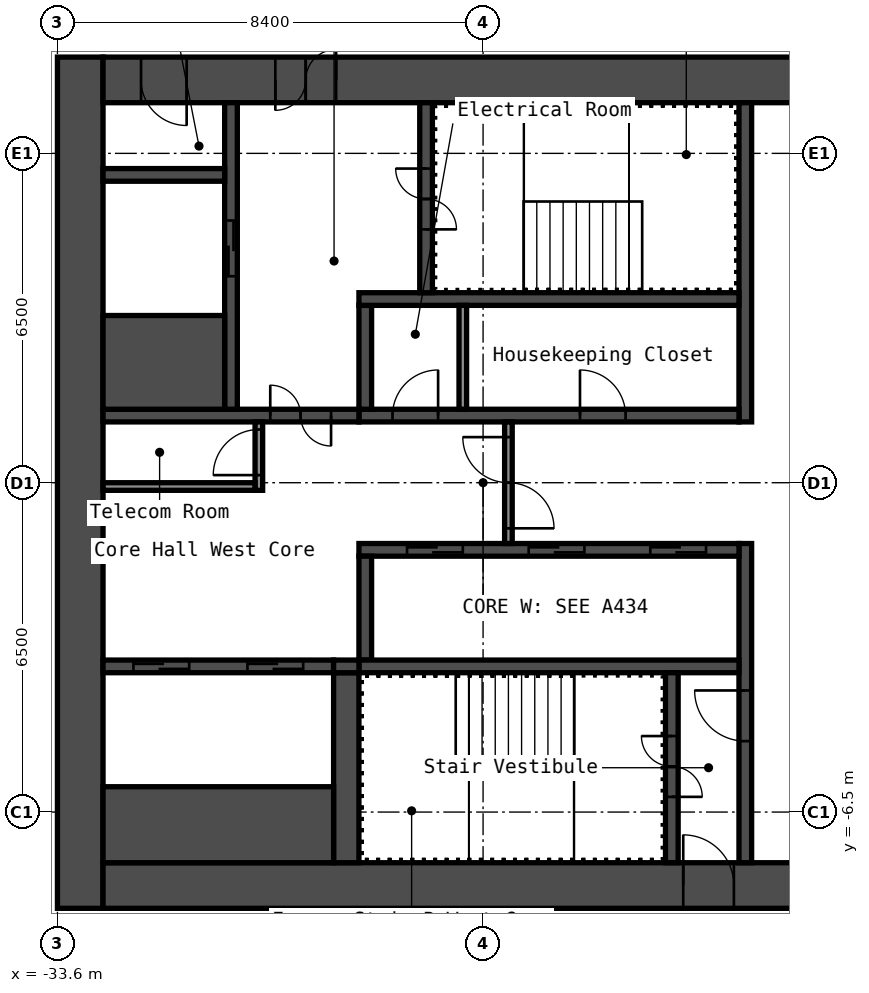
"""IFC4 building model, lengths in metres.
Left out: names, types, materials, properties, quantities, classifications, styles, units other than length and angle.
Written with IfcOpenShell. Run it as: python <this file> out.ifc"""

import sys

from ifc_helpers import new_model, si_unit, direction, frame, frame_2d, origin, place, context, subcontext, project, spatial, rectangle, extrude, element, fill, save


model = new_model("IFC4")
c1 = context("Model", 3, precision=1e-05, world=origin(), true_north=direction((0.0, 1.0)))
c2 = subcontext(c1, "Body", "Model", "MODEL_VIEW")
j1 = project(units=[si_unit("LENGTHUNIT", "METRE"), si_unit("PLANEANGLEUNIT", "RADIAN")], contexts=[c1])
p1 = place(None, origin())
s1 = spatial("IfcSite", under=j1, at=p1, CompositionType="ELEMENT")
p2 = place(p1, origin())
s2 = spatial("IfcBuilding", under=s1, at=p2, CompositionType="ELEMENT")
p3 = place(p2, frame((0.0, 0.0, 232.6)))
s3 = spatial("IfcBuildingStorey", under=s2, at=p3, CompositionType="ELEMENT", Elevation=232.6)
p4 = place(p3, frame((-33.15, -8.4, 0.0), z_axis=(0.0, 0.0, 1.0), x_axis=(0.0, 1.0, 0.0)))
e1 = element("IfcWall", 1, at=p4, inside=s3, PredefinedType="SHEAR", context=c2, shape_type="SweptSolid", body=[
    extrude(rectangle(XDim=16.8, YDim=0.9, at=frame_2d((8.4, 0.0))), origin(), (0.0, 0.0, 1.0), 5.95),
])
p5 = place(p3, frame((-32.7, 7.95, 0.0), z_axis=(0.0, 0.0, 1.0), x_axis=(1.0, 0.0, 0.0)))
e2 = element("IfcWall", 2, at=p5, inside=s3, PredefinedType="SHEAR", context=c2, shape_type="SweptSolid", body=[
    extrude(rectangle(XDim=15.0, YDim=0.9, at=frame_2d((7.5, 0.0))), origin(), (0.0, 0.0, 1.0), 5.95),
])
p6 = place(p5, frame((3.4, 0.0, 0.0)))
e3 = element("IfcOpeningElement", 3, at=p6, cuts=e2, PredefinedType="OPENING", context=c2, shape_type="SweptSolid", body=[
    extrude(rectangle(XDim=1.2, YDim=2.1, at=frame_2d((0.6, 1.05))), frame((0.0, 0.46, 0.0), z_axis=(0.0, -1.0, 0.0), x_axis=(1.0, 0.0, 0.0)), (0.0, 0.0, 1.0), 0.92),
])
p7 = place(p5, frame((0.75, 0.0, 0.0)))
e4 = element("IfcOpeningElement", 4, at=p7, cuts=e2, PredefinedType="OPENING", context=c2, shape_type="SweptSolid", body=[
    extrude(rectangle(XDim=0.9, YDim=2.1, at=frame_2d((0.45, 1.05))), frame((0.0, 0.46, 0.0), z_axis=(0.0, -1.0, 0.0), x_axis=(1.0, 0.0, 0.0)), (0.0, 0.0, 1.0), 0.92),
])
p8 = place(p3, frame((-32.7, -7.95, 0.0), z_axis=(0.0, 0.0, 1.0), x_axis=(1.0, 0.0, 0.0)))
e5 = element("IfcWall", 5, at=p8, inside=s3, PredefinedType="SHEAR", context=c2, shape_type="SweptSolid", body=[
    extrude(rectangle(XDim=15.0, YDim=0.9, at=frame_2d((7.5, 0.0))), origin(), (0.0, 0.0, 1.0), 5.95),
])
p9 = place(p8, frame((11.45, 0.0, 0.0)))
e6 = element("IfcOpeningElement", 6, at=p9, cuts=e5, PredefinedType="OPENING", context=c2, shape_type="SweptSolid", body=[
    extrude(rectangle(XDim=1.0, YDim=2.1, at=frame_2d((0.5, 1.05))), frame((0.0, 0.46, 0.0), z_axis=(0.0, -1.0, 0.0), x_axis=(1.0, 0.0, 0.0)), (0.0, 0.0, 1.0), 0.92),
])
p10 = place(p3, frame((-20.025, 1.2, 0.0), z_axis=(0.0, 0.0, 1.0), x_axis=(0.0, 1.0, 0.0)))
e7 = element("IfcWall", 7, at=p10, inside=s3, PredefinedType="SHEAR", context=c2, shape_type="SweptSolid", body=[
    extrude(rectangle(XDim=6.3, YDim=0.25, at=frame_2d((3.15, 0.0))), origin(), (0.0, 0.0, 1.0), 5.95),
])
p11 = place(p3, frame((-20.025, -7.5, 0.0), z_axis=(0.0, 0.0, 1.0), x_axis=(0.0, 1.0, 0.0)))
e8 = element("IfcWall", 8, at=p11, inside=s3, PredefinedType="SHEAR", context=c2, shape_type="SweptSolid", body=[
    extrude(rectangle(XDim=6.3, YDim=0.25, at=frame_2d((3.15, 0.0))), origin(), (0.0, 0.0, 1.0), 5.95),
])
p12 = place(p11, frame((2.4, 0.0, 0.0)))
e9 = element("IfcOpeningElement", 9, at=p12, cuts=e8, PredefinedType="OPENING", context=c2, shape_type="SweptSolid", body=[
    extrude(rectangle(XDim=1.0, YDim=2.1, at=frame_2d((0.5, 1.05))), frame((0.0, 0.135, 0.0), z_axis=(0.0, -1.0, 0.0), x_axis=(1.0, 0.0, 0.0)), (0.0, 0.0, 1.0), 0.27),
])
p13 = place(p3, frame((-27.65, 1.325, 0.0), z_axis=(0.0, 0.0, 1.0), x_axis=(1.0, 0.0, 0.0)))
e10 = element("IfcWall", 10, at=p13, inside=s3, PredefinedType="SHEAR", context=c2, shape_type="SweptSolid", body=[
    extrude(rectangle(XDim=7.5, YDim=0.25, at=frame_2d((3.75, 0.0))), origin(), (0.0, 0.0, 1.0), 5.95),
])
p14 = place(p13, frame((4.363, 0.0, 0.0)))
e11 = element("IfcOpeningElement", 11, at=p14, cuts=e10, PredefinedType="OPENING", context=c2, shape_type="SweptSolid", body=[
    extrude(rectangle(XDim=0.9, YDim=2.1, at=frame_2d((0.45, 1.05))), frame((0.0, 0.135, 0.0), z_axis=(0.0, -1.0, 0.0), x_axis=(1.0, 0.0, 0.0)), (0.0, 0.0, 1.0), 0.27),
])
p15 = place(p13, frame((0.663, 0.0, 0.0)))
e12 = element("IfcOpeningElement", 12, at=p15, cuts=e10, PredefinedType="OPENING", context=c2, shape_type="SweptSolid", body=[
    extrude(rectangle(XDim=0.9, YDim=2.1, at=frame_2d((0.45, 1.05))), frame((0.0, 0.135, 0.0), z_axis=(0.0, -1.0, 0.0), x_axis=(1.0, 0.0, 0.0)), (0.0, 0.0, 1.0), 0.27),
])
p16 = place(p3, frame((-27.525, 1.45, 0.0), z_axis=(0.0, 0.0, 1.0), x_axis=(0.0, 1.0, 0.0)))
e13 = element("IfcWall", 13, at=p16, inside=s3, PredefinedType="SHEAR", context=c2, shape_type="SweptSolid", body=[
    extrude(rectangle(XDim=2.05, YDim=0.25, at=frame_2d((1.025, 0.0))), origin(), (0.0, 0.0, 1.0), 5.95),
])
p17 = place(p3, frame((-27.65, 3.625, 0.0), z_axis=(0.0, 0.0, 1.0), x_axis=(1.0, 0.0, 0.0)))
e14 = element("IfcWall", 14, at=p17, inside=s3, PredefinedType="SHEAR", context=c2, shape_type="SweptSolid", body=[
    extrude(rectangle(XDim=7.5, YDim=0.25, at=frame_2d((3.75, 0.0))), origin(), (0.0, 0.0, 1.0), 5.95),
])
p18 = place(p3, frame((-26.325, 3.75, 0.0), z_axis=(0.0, 0.0, 1.0), x_axis=(0.0, 1.0, 0.0)))
e15 = element("IfcWall", 15, at=p18, inside=s3, PredefinedType="SHEAR", context=c2, shape_type="SweptSolid", body=[
    extrude(rectangle(XDim=3.75, YDim=0.25, at=frame_2d((1.875, 0.0))), origin(), (0.0, 0.0, 1.0), 5.95),
])
p19 = place(p18, frame((1.25, 0.0, 0.0)))
e16 = element("IfcOpeningElement", 16, at=p19, cuts=e15, PredefinedType="OPENING", context=c2, shape_type="SweptSolid", body=[
    extrude(rectangle(XDim=1.2, YDim=2.1, at=frame_2d((0.6, 1.05))), frame((0.0, 0.135, 0.0), z_axis=(0.0, -1.0, 0.0), x_axis=(1.0, 0.0, 0.0)), (0.0, 0.0, 1.0), 0.27),
])
p20 = place(p3, frame((-32.7, 1.325, 0.0), z_axis=(0.0, 0.0, 1.0), x_axis=(1.0, 0.0, 0.0)))
e17 = element("IfcWall", 17, at=p20, inside=s3, PredefinedType="SHEAR", context=c2, shape_type="SweptSolid", body=[
    extrude(rectangle(XDim=5.05, YDim=0.25, at=frame_2d((2.525, 0.0))), origin(), (0.0, 0.0, 1.0), 5.95),
])
p21 = place(p20, frame((3.3, 0.0, 0.0)))
e18 = element("IfcOpeningElement", 18, at=p21, cuts=e17, PredefinedType="OPENING", context=c2, shape_type="SweptSolid", body=[
    extrude(rectangle(XDim=1.2, YDim=2.1, at=frame_2d((0.6, 1.05))), frame((0.0, 0.135, 0.0), z_axis=(0.0, -1.0, 0.0), x_axis=(1.0, 0.0, 0.0)), (0.0, 0.0, 1.0), 0.27),
])
p22 = place(p3, frame((-30.175, 1.45, 0.0), z_axis=(0.0, 0.0, 1.0), x_axis=(0.0, 1.0, 0.0)))
e19 = element("IfcWall", 19, at=p22, inside=s3, PredefinedType="SHEAR", context=c2, shape_type="SweptSolid", body=[
    extrude(rectangle(XDim=6.05, YDim=0.25, at=frame_2d((3.025, 0.0))), origin(), (0.0, 0.0, 1.0), 5.95),
])
p23 = place(p22, frame((2.625, 0.0, 0.0)))
e20 = element("IfcOpeningElement", 20, at=p23, cuts=e19, PredefinedType="OPENING", context=c2, shape_type="SweptSolid", body=[
    extrude(rectangle(XDim=1.1, YDim=2.1, at=frame_2d((0.55, 1.05))), frame((0.0, 0.135, 0.0), z_axis=(0.0, -1.0, 0.0), x_axis=(1.0, 0.0, 0.0)), (0.0, 0.0, 1.0), 0.27),
])
p24 = place(p3, frame((-32.7, 2.375, 0.0), z_axis=(0.0, 0.0, 1.0), x_axis=(1.0, 0.0, 0.0)))
e21 = element("IfcWall", 21, at=p24, inside=s3, PredefinedType="SHEAR", context=c2, shape_type="SweptSolid", body=[
    extrude(rectangle(XDim=2.4, YDim=1.85, at=frame_2d((1.2, 0.0))), origin(), (0.0, 0.0, 1.0), 5.95),
])
p25 = place(p3, frame((-32.7, 6.075, 0.0), z_axis=(0.0, 0.0, 1.0), x_axis=(1.0, 0.0, 0.0)))
e22 = element("IfcWall", 22, at=p25, inside=s3, PredefinedType="SHEAR", context=c2, shape_type="SweptSolid", body=[
    extrude(rectangle(XDim=2.4, YDim=0.25, at=frame_2d((1.2, 0.0))), origin(), (0.0, 0.0, 1.0), 5.95),
])
p26 = place(p3, frame((-27.65, -1.325, 0.0), z_axis=(0.0, 0.0, 1.0), x_axis=(1.0, 0.0, 0.0)))
e23 = element("IfcWall", 23, at=p26, inside=s3, PredefinedType="SHEAR", context=c2, shape_type="SweptSolid", body=[
    extrude(rectangle(XDim=7.5, YDim=0.25, at=frame_2d((3.75, 0.0))), origin(), (0.0, 0.0, 1.0), 5.95),
])
p27 = place(p26, frame((5.75, 0.0, 0.0)))
e24 = element("IfcOpeningElement", 24, at=p27, cuts=e23, PredefinedType="OPENING", context=c2, shape_type="SweptSolid", body=[
    extrude(rectangle(XDim=1.1, YDim=2.1, at=frame_2d((0.55, 1.05))), frame((0.0, 0.135, 0.0), z_axis=(0.0, -1.0, 0.0), x_axis=(1.0, 0.0, 0.0)), (0.0, 0.0, 1.0), 0.27),
])
p28 = place(p26, frame((3.35, 0.0, 0.0)))
e25 = element("IfcOpeningElement", 25, at=p28, cuts=e23, PredefinedType="OPENING", context=c2, shape_type="SweptSolid", body=[
    extrude(rectangle(XDim=1.1, YDim=2.1, at=frame_2d((0.55, 1.05))), frame((0.0, 0.135, 0.0), z_axis=(0.0, -1.0, 0.0), x_axis=(1.0, 0.0, 0.0)), (0.0, 0.0, 1.0), 0.27),
])
p29 = place(p26, frame((0.95, 0.0, 0.0)))
e26 = element("IfcOpeningElement", 26, at=p29, cuts=e23, PredefinedType="OPENING", context=c2, shape_type="SweptSolid", body=[
    extrude(rectangle(XDim=1.1, YDim=2.1, at=frame_2d((0.55, 1.05))), frame((0.0, 0.135, 0.0), z_axis=(0.0, -1.0, 0.0), x_axis=(1.0, 0.0, 0.0)), (0.0, 0.0, 1.0), 0.27),
])
p30 = place(p3, frame((-27.525, -3.5, 0.0), z_axis=(0.0, 0.0, 1.0), x_axis=(0.0, 1.0, 0.0)))
e27 = element("IfcWall", 27, at=p30, inside=s3, PredefinedType="SHEAR", context=c2, shape_type="SweptSolid", body=[
    extrude(rectangle(XDim=2.05, YDim=0.25, at=frame_2d((1.025, 0.0))), origin(), (0.0, 0.0, 1.0), 5.95),
])
p31 = place(p3, frame((-27.65, -3.625, 0.0), z_axis=(0.0, 0.0, 1.0), x_axis=(1.0, 0.0, 0.0)))
e28 = element("IfcWall", 28, at=p31, inside=s3, PredefinedType="SHEAR", context=c2, shape_type="SweptSolid", body=[
    extrude(rectangle(XDim=7.5, YDim=0.25, at=frame_2d((3.75, 0.0))), origin(), (0.0, 0.0, 1.0), 5.95),
])
p32 = place(p3, frame((-21.475, -7.5, 0.0), z_axis=(0.0, 0.0, 1.0), x_axis=(0.0, 1.0, 0.0)))
e29 = element("IfcWall", 29, at=p32, inside=s3, PredefinedType="SHEAR", context=c2, shape_type="SweptSolid", body=[
    extrude(rectangle(XDim=3.75, YDim=0.25, at=frame_2d((1.875, 0.0))), origin(), (0.0, 0.0, 1.0), 5.95),
])
p33 = place(p32, frame((1.3, 0.0, 0.0)))
e30 = element("IfcOpeningElement", 30, at=p33, cuts=e29, PredefinedType="OPENING", context=c2, shape_type="SweptSolid", body=[
    extrude(rectangle(XDim=1.2, YDim=2.1, at=frame_2d((0.6, 1.05))), frame((0.0, 0.135, 0.0), z_axis=(0.0, -1.0, 0.0), x_axis=(1.0, 0.0, 0.0)), (0.0, 0.0, 1.0), 0.27),
])
p34 = place(p3, frame((-27.9, -7.5, 0.0), z_axis=(0.0, 0.0, 1.0), x_axis=(0.0, 1.0, 0.0)))
e31 = element("IfcWall", 31, at=p34, inside=s3, PredefinedType="SHEAR", context=c2, shape_type="SweptSolid", body=[
    extrude(rectangle(XDim=3.75, YDim=0.5, at=frame_2d((1.875, 0.0))), origin(), (0.0, 0.0, 1.0), 5.95),
])
p35 = place(p3, frame((-32.7, -3.625, 0.0), z_axis=(0.0, 0.0, 1.0), x_axis=(1.0, 0.0, 0.0)))
e32 = element("IfcWall", 32, at=p35, inside=s3, PredefinedType="SHEAR", context=c2, shape_type="SweptSolid", body=[
    extrude(rectangle(XDim=4.55, YDim=0.25, at=frame_2d((2.275, 0.0))), origin(), (0.0, 0.0, 1.0), 5.95),
])
p36 = place(p35, frame((2.85, 0.0, 0.0)))
e33 = element("IfcOpeningElement", 33, at=p36, cuts=e32, PredefinedType="OPENING", context=c2, shape_type="SweptSolid", body=[
    extrude(rectangle(XDim=1.1, YDim=2.1, at=frame_2d((0.55, 1.05))), frame((0.0, 0.135, 0.0), z_axis=(0.0, -1.0, 0.0), x_axis=(1.0, 0.0, 0.0)), (0.0, 0.0, 1.0), 0.27),
])
p37 = place(p35, frame((0.6, 0.0, 0.0)))
e34 = element("IfcOpeningElement", 34, at=p37, cuts=e32, PredefinedType="OPENING", context=c2, shape_type="SweptSolid", body=[
    extrude(rectangle(XDim=1.1, YDim=2.1, at=frame_2d((0.55, 1.05))), frame((0.0, 0.135, 0.0), z_axis=(0.0, -1.0, 0.0), x_axis=(1.0, 0.0, 0.0)), (0.0, 0.0, 1.0), 0.27),
])
p38 = place(p3, frame((-32.7, -6.75, 0.0), z_axis=(0.0, 0.0, 1.0), x_axis=(1.0, 0.0, 0.0)))
e35 = element("IfcWall", 35, at=p38, inside=s3, PredefinedType="SHEAR", context=c2, shape_type="SweptSolid", body=[
    extrude(rectangle(XDim=4.55, YDim=1.5, at=frame_2d((2.275, 0.0))), origin(), (0.0, 0.0, 1.0), 5.95),
])
p39 = place(p3, frame((-28.15, -3.625, 0.0), z_axis=(0.0, 0.0, 1.0), x_axis=(1.0, 0.0, 0.0)))
e36 = element("IfcWall", 36, at=p39, inside=s3, PredefinedType="SHEAR", context=c2, shape_type="SweptSolid", body=[
    extrude(rectangle(XDim=0.5, YDim=0.25, at=frame_2d((0.25, 0.0))), origin(), (0.0, 0.0, 1.0), 5.95),
])
p40 = place(p3, frame((-24.7, -1.2, 0.0), z_axis=(0.0, 0.0, 1.0), x_axis=(0.0, 1.0, 0.0)))
e37 = element("IfcWall", 37, at=p40, inside=s3, PredefinedType="PARTITIONING", context=c2, shape_type="SweptSolid", body=[
    extrude(rectangle(XDim=2.4, YDim=0.15, at=frame_2d((1.2, 0.0))), origin(), (0.0, 0.0, 1.0), 5.95),
])
p41 = place(p40, frame((0.3, 0.0, 0.0)))
e38 = element("IfcOpeningElement", 38, at=p41, cuts=e37, PredefinedType="OPENING", context=c2, shape_type="SweptSolid", body=[
    extrude(rectangle(XDim=1.8, YDim=2.1, at=frame_2d((0.9, 1.05))), frame((0.0, 0.085, 0.0), z_axis=(0.0, -1.0, 0.0), x_axis=(1.0, 0.0, 0.0)), (0.0, 0.0, 1.0), 0.17),
])
p42 = place(p3, frame((-29.625, -0.15, 0.0), z_axis=(0.0, 0.0, 1.0), x_axis=(0.0, 1.0, 0.0)))
e39 = element("IfcWall", 39, at=p42, inside=s3, PredefinedType="PARTITIONING", context=c2, shape_type="SweptSolid", body=[
    extrude(rectangle(XDim=1.35, YDim=0.15, at=frame_2d((0.675, 0.0))), origin(), (0.0, 0.0, 1.0), 5.95),
])
p43 = place(p42, frame((0.3, 0.0, 0.0)))
e40 = element("IfcOpeningElement", 40, at=p43, cuts=e39, PredefinedType="OPENING", context=c2, shape_type="SweptSolid", body=[
    extrude(rectangle(XDim=0.9, YDim=2.1, at=frame_2d((0.45, 1.05))), frame((0.0, 0.085, 0.0), z_axis=(0.0, -1.0, 0.0), x_axis=(1.0, 0.0, 0.0)), (0.0, 0.0, 1.0), 0.17),
])
p44 = place(p3, frame((-32.7, -0.075, 0.0), z_axis=(0.0, 0.0, 1.0), x_axis=(1.0, 0.0, 0.0)))
e41 = element("IfcWall", 41, at=p44, inside=s3, PredefinedType="PARTITIONING", context=c2, shape_type="SweptSolid", body=[
    extrude(rectangle(XDim=3.0, YDim=0.15, at=frame_2d((1.5, 0.0))), origin(), (0.0, 0.0, 1.0), 5.95),
])
p45 = place(p3, frame((-25.6, 1.45, 0.0), z_axis=(0.0, 0.0, 1.0), x_axis=(0.0, 1.0, 0.0)))
e42 = element("IfcWall", 42, at=p45, inside=s3, PredefinedType="PARTITIONING", context=c2, shape_type="SweptSolid", body=[
    extrude(rectangle(XDim=2.05, YDim=0.15, at=frame_2d((1.025, 0.0))), origin(), (0.0, 0.0, 1.0), 5.95),
])
p46 = place(p6, origin())
e43 = element("IfcDoor", 43, at=p46, inside=s3, OperationType="DOUBLE_DOOR_SINGLE_SWING", PredefinedType="DOOR", context=c2, shape_type="SweptSolid", body=[
    extrude(rectangle(XDim=1.2, YDim=2.1, at=frame_2d((0.6, 1.05))), frame((0.0, 0.025, 0.0), z_axis=(0.0, -1.0, 0.0), x_axis=(1.0, 0.0, 0.0)), (0.0, 0.0, 1.0), 0.05),
])
fill(e3, e43)
p47 = place(p7, origin())
e44 = element("IfcDoor", 44, at=p47, inside=s3, OperationType="SINGLE_SWING_RIGHT", PredefinedType="DOOR", context=c2, shape_type="SweptSolid", body=[
    extrude(rectangle(XDim=0.9, YDim=2.1, at=frame_2d((0.45, 1.05))), frame((0.0, 0.025, 0.0), z_axis=(0.0, -1.0, 0.0), x_axis=(1.0, 0.0, 0.0)), (0.0, 0.0, 1.0), 0.05),
])
fill(e4, e44)
p48 = place(p9, origin())
e45 = element("IfcDoor", 45, at=p48, inside=s3, OperationType="SINGLE_SWING_RIGHT", PredefinedType="DOOR", context=c2, shape_type="SweptSolid", body=[
    extrude(rectangle(XDim=1.0, YDim=2.1, at=frame_2d((0.5, 1.05))), frame((0.0, 0.025, 0.0), z_axis=(0.0, -1.0, 0.0), x_axis=(1.0, 0.0, 0.0)), (0.0, 0.0, 1.0), 0.05),
])
fill(e6, e45)
p49 = place(p19, origin())
e46 = element("IfcDoor", 46, at=p49, inside=s3, OperationType="DOUBLE_DOOR_SINGLE_SWING", PredefinedType="DOOR", context=c2, shape_type="SweptSolid", body=[
    extrude(rectangle(XDim=1.2, YDim=2.1, at=frame_2d((0.6, 1.05))), frame((0.0, 0.025, 0.0), z_axis=(0.0, -1.0, 0.0), x_axis=(1.0, 0.0, 0.0)), (0.0, 0.0, 1.0), 0.05),
])
fill(e16, e46)
p50 = place(p33, origin())
e47 = element("IfcDoor", 47, at=p50, inside=s3, OperationType="DOUBLE_DOOR_SINGLE_SWING", PredefinedType="DOOR", context=c2, shape_type="SweptSolid", body=[
    extrude(rectangle(XDim=1.2, YDim=2.1, at=frame_2d((0.6, 1.05))), frame((0.0, 0.025, 0.0), z_axis=(0.0, -1.0, 0.0), x_axis=(1.0, 0.0, 0.0)), (0.0, 0.0, 1.0), 0.05),
])
fill(e30, e47)
p51 = place(p12, origin())
e48 = element("IfcDoor", 48, at=p51, inside=s3, OperationType="SINGLE_SWING_LEFT", PredefinedType="DOOR", context=c2, shape_type="SweptSolid", body=[
    extrude(rectangle(XDim=1.0, YDim=2.1, at=frame_2d((0.5, 1.05))), frame((0.0, 0.025, 0.0), z_axis=(0.0, -1.0, 0.0), x_axis=(1.0, 0.0, 0.0)), (0.0, 0.0, 1.0), 0.05),
])
fill(e9, e48)
p52 = place(p21, origin())
e49 = element("IfcDoor", 49, at=p52, inside=s3, OperationType="DOUBLE_DOOR_SINGLE_SWING", PredefinedType="DOOR", context=c2, shape_type="SweptSolid", body=[
    extrude(rectangle(XDim=1.2, YDim=2.1, at=frame_2d((0.6, 1.05))), frame((0.0, 0.025, 0.0), z_axis=(0.0, -1.0, 0.0), x_axis=(1.0, 0.0, 0.0)), (0.0, 0.0, 1.0), 0.05),
])
fill(e18, e49)
p53 = place(p41, origin())
e50 = element("IfcDoor", 50, at=p53, inside=s3, OperationType="DOUBLE_DOOR_SINGLE_SWING", PredefinedType="DOOR", context=c2, shape_type="SweptSolid", body=[
    extrude(rectangle(XDim=1.8, YDim=2.1, at=frame_2d((0.9, 1.05))), frame((0.0, 0.025, 0.0), z_axis=(0.0, -1.0, 0.0), x_axis=(1.0, 0.0, 0.0)), (0.0, 0.0, 1.0), 0.05),
])
fill(e38, e50)
p54 = place(p43, origin())
e51 = element("IfcDoor", 51, at=p54, inside=s3, OperationType="SINGLE_SWING_RIGHT", PredefinedType="DOOR", context=c2, shape_type="SweptSolid", body=[
    extrude(rectangle(XDim=0.9, YDim=2.1, at=frame_2d((0.45, 1.05))), frame((0.0, 0.025, 0.0), z_axis=(0.0, -1.0, 0.0), x_axis=(1.0, 0.0, 0.0)), (0.0, 0.0, 1.0), 0.05),
])
fill(e40, e51)
p55 = place(p14, origin())
e52 = element("IfcDoor", 52, at=p55, inside=s3, OperationType="SINGLE_SWING_RIGHT", PredefinedType="DOOR", context=c2, shape_type="SweptSolid", body=[
    extrude(rectangle(XDim=0.9, YDim=2.1, at=frame_2d((0.45, 1.05))), frame((0.0, 0.025, 0.0), z_axis=(0.0, -1.0, 0.0), x_axis=(1.0, 0.0, 0.0)), (0.0, 0.0, 1.0), 0.05),
])
fill(e11, e52)
p56 = place(p15, origin())
e53 = element("IfcDoor", 53, at=p56, inside=s3, OperationType="SINGLE_SWING_LEFT", PredefinedType="DOOR", context=c2, shape_type="SweptSolid", body=[
    extrude(rectangle(XDim=0.9, YDim=2.1, at=frame_2d((0.45, 1.05))), frame((0.0, 0.025, 0.0), z_axis=(0.0, -1.0, 0.0), x_axis=(1.0, 0.0, 0.0)), (0.0, 0.0, 1.0), 0.05),
])
fill(e12, e53)
p57 = place(p27, origin())
e54 = element("IfcDoor", 54, at=p57, inside=s3, OperationType="DOUBLE_DOOR_SLIDING", PredefinedType="DOOR", context=c2, shape_type="SweptSolid", body=[
    extrude(rectangle(XDim=1.1, YDim=2.1, at=frame_2d((0.55, 1.05))), frame((0.0, 0.025, 0.0), z_axis=(0.0, -1.0, 0.0), x_axis=(1.0, 0.0, 0.0)), (0.0, 0.0, 1.0), 0.05),
])
fill(e24, e54)
p58 = place(p28, origin())
e55 = element("IfcDoor", 55, at=p58, inside=s3, OperationType="DOUBLE_DOOR_SLIDING", PredefinedType="DOOR", context=c2, shape_type="SweptSolid", body=[
    extrude(rectangle(XDim=1.1, YDim=2.1, at=frame_2d((0.55, 1.05))), frame((0.0, 0.025, 0.0), z_axis=(0.0, -1.0, 0.0), x_axis=(1.0, 0.0, 0.0)), (0.0, 0.0, 1.0), 0.05),
])
fill(e25, e55)
p59 = place(p29, origin())
e56 = element("IfcDoor", 56, at=p59, inside=s3, OperationType="DOUBLE_DOOR_SLIDING", PredefinedType="DOOR", context=c2, shape_type="SweptSolid", body=[
    extrude(rectangle(XDim=1.1, YDim=2.1, at=frame_2d((0.55, 1.05))), frame((0.0, 0.025, 0.0), z_axis=(0.0, -1.0, 0.0), x_axis=(1.0, 0.0, 0.0)), (0.0, 0.0, 1.0), 0.05),
])
fill(e26, e56)
p60 = place(p23, origin())
e57 = element("IfcDoor", 57, at=p60, inside=s3, OperationType="DOUBLE_DOOR_SLIDING", PredefinedType="DOOR", context=c2, shape_type="SweptSolid", body=[
    extrude(rectangle(XDim=1.1, YDim=2.1, at=frame_2d((0.55, 1.05))), frame((0.0, 0.025, 0.0), z_axis=(0.0, -1.0, 0.0), x_axis=(1.0, 0.0, 0.0)), (0.0, 0.0, 1.0), 0.05),
])
fill(e20, e57)
p61 = place(p36, origin())
e58 = element("IfcDoor", 58, at=p61, inside=s3, OperationType="DOUBLE_DOOR_SLIDING", PredefinedType="DOOR", context=c2, shape_type="SweptSolid", body=[
    extrude(rectangle(XDim=1.1, YDim=2.1, at=frame_2d((0.55, 1.05))), frame((0.0, 0.025, 0.0), z_axis=(0.0, -1.0, 0.0), x_axis=(1.0, 0.0, 0.0)), (0.0, 0.0, 1.0), 0.05),
])
fill(e33, e58)
p62 = place(p37, origin())
e59 = element("IfcDoor", 59, at=p62, inside=s3, OperationType="DOUBLE_DOOR_SLIDING", PredefinedType="DOOR", context=c2, shape_type="SweptSolid", body=[
    extrude(rectangle(XDim=1.1, YDim=2.1, at=frame_2d((0.55, 1.05))), frame((0.0, 0.025, 0.0), z_axis=(0.0, -1.0, 0.0), x_axis=(1.0, 0.0, 0.0)), (0.0, 0.0, 1.0), 0.05),
])
fill(e34, e59)
save(model, sys.argv[1])
